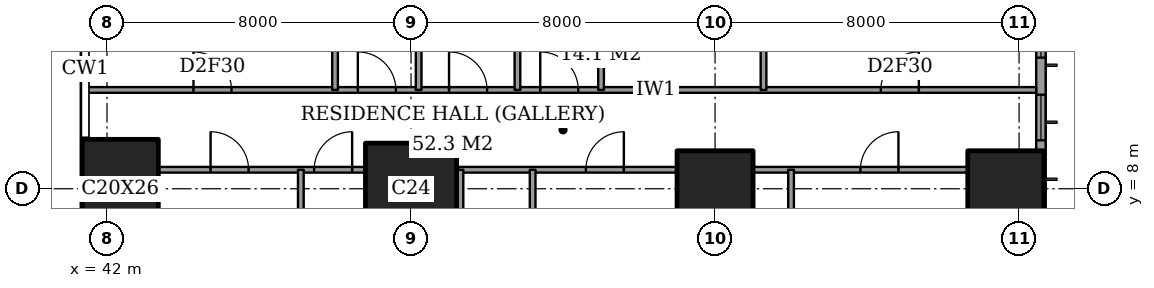
"""IFC4 building model, lengths in metres.
Left out: names, types, materials, properties, quantities, classifications, styles, units other than length and angle.
Written with IfcOpenShell. Run it as: python <this file> out.ifc"""

import sys

from ifc_helpers import new_model, si_unit, direction, frame, frame_2d, origin, origin_2d, place, context, subcontext, project, spatial, rectangle, extrude, element, fill, save


model = new_model("IFC4")
c1 = context("Model", 3, precision=1e-05, world=origin(), true_north=direction((0.0, 1.0)))
c2 = subcontext(c1, "Body", "Model", "MODEL_VIEW")
j1 = project(units=[si_unit("LENGTHUNIT", "METRE"), si_unit("PLANEANGLEUNIT", "RADIAN")], contexts=[c1])
p1 = place(None, origin())
s1 = spatial("IfcSite", under=j1, at=p1, CompositionType="ELEMENT")
p2 = place(p1, origin())
s2 = spatial("IfcBuilding", under=s1, at=p2, CompositionType="ELEMENT")
p3 = place(p2, frame((0.0, 0.0, 62.0)))
s3 = spatial("IfcBuildingStorey", under=s2, at=p3, CompositionType="ELEMENT", Elevation=62.0)
p4 = place(p3, frame((42.35, 8.0, 0.0), z_axis=(0.0, 0.0, 1.0), x_axis=(1.0, 0.0, 0.0)))
e1 = element("IfcColumn", 1, at=p4, inside=s3, PredefinedType="COLUMN", context=c2, shape_type="SweptSolid", body=[
    extrude(rectangle(XDim=2.0, YDim=2.6, at=origin_2d()), origin(), (0.0, 0.0, 1.0), 3.6),
])
p5 = place(p3, frame((50.0, 8.0, 0.0), z_axis=(0.0, 0.0, 1.0), x_axis=(1.0, 0.0, 0.0)))
e2 = element("IfcColumn", 2, at=p5, inside=s3, PredefinedType="COLUMN", context=c2, shape_type="SweptSolid", body=[
    extrude(rectangle(XDim=2.4, YDim=2.4, at=origin_2d()), origin(), (0.0, 0.0, 1.0), 3.6),
])
for number, where, z_axis, x_axis in (
    (3, (58.0, 8.0, 0.0), (0.0, 0.0, 1.0), (1.0, 0.0, 0.0)),
    (4, (65.65, 8.0, 0.0), (0.0, 0.0, 1.0), (1.0, 0.0, 0.0)),
):
    element("IfcColumn", number, at=place(p3, frame(where, z_axis=z_axis, x_axis=x_axis)), inside=s3, PredefinedType="COLUMN", context=c2, shape_type="SweptSolid", body=[
        extrude(rectangle(XDim=2.0, YDim=2.0, at=origin_2d()), origin(), (0.0, 0.0, 1.0), 3.6),
    ])
p6 = place(p3, frame((66.575, 3.175, 0.0), z_axis=(0.0, 0.0, 1.0), x_axis=(0.0, 1.0, 0.0)))
e5 = element("IfcWall", 5, at=p6, inside=s3, PredefinedType="SOLIDWALL", context=c2, shape_type="SweptSolid", body=[
    extrude(rectangle(XDim=41.65, YDim=0.25, at=frame_2d((20.825, 0.0))), origin(), (0.0, 0.0, 1.0), 3.6),
])
p7 = place(p6, frame((0.775, 0.0, 0.6)))
e6 = element("IfcOpeningElement", 6, at=p7, cuts=e5, PredefinedType="OPENING", context=c2, shape_type="SweptSolid", body=[
    extrude(rectangle(XDim=2.4, YDim=2.0, at=frame_2d((1.2, 1.0))), frame((0.0, 0.135, 0.0), z_axis=(0.0, -1.0, 0.0), x_axis=(1.0, 0.0, 0.0)), (0.0, 0.0, 1.0), 0.27),
])
p8 = place(p6, frame((6.1, 0.0, 0.6)))
e7 = element("IfcOpeningElement", 7, at=p8, cuts=e5, PredefinedType="OPENING", context=c2, shape_type="SweptSolid", body=[
    extrude(rectangle(XDim=1.2, YDim=2.0, at=frame_2d((0.6, 1.0))), frame((0.0, 0.135, 0.0), z_axis=(0.0, -1.0, 0.0), x_axis=(1.0, 0.0, 0.0)), (0.0, 0.0, 1.0), 0.27),
])
p9 = place(p6, frame((8.275, 0.0, 0.6)))
e8 = element("IfcOpeningElement", 8, at=p9, cuts=e5, PredefinedType="OPENING", context=c2, shape_type="SweptSolid", body=[
    extrude(rectangle(XDim=2.4, YDim=2.0, at=frame_2d((1.2, 1.0))), frame((0.0, 0.135, 0.0), z_axis=(0.0, -1.0, 0.0), x_axis=(1.0, 0.0, 0.0)), (0.0, 0.0, 1.0), 0.27),
])
p10 = place(p6, frame((15.775, 0.0, 0.6)))
e9 = element("IfcOpeningElement", 9, at=p10, cuts=e5, PredefinedType="OPENING", context=c2, shape_type="SweptSolid", body=[
    extrude(rectangle(XDim=2.4, YDim=2.0, at=frame_2d((1.2, 1.0))), frame((0.0, 0.135, 0.0), z_axis=(0.0, -1.0, 0.0), x_axis=(1.0, 0.0, 0.0)), (0.0, 0.0, 1.0), 0.27),
])
p11 = place(p6, frame((23.475, 0.0, 0.6)))
e10 = element("IfcOpeningElement", 10, at=p11, cuts=e5, PredefinedType="OPENING", context=c2, shape_type="SweptSolid", body=[
    extrude(rectangle(XDim=2.4, YDim=2.0, at=frame_2d((1.2, 1.0))), frame((0.0, 0.135, 0.0), z_axis=(0.0, -1.0, 0.0), x_axis=(1.0, 0.0, 0.0)), (0.0, 0.0, 1.0), 0.27),
])
p12 = place(p6, frame((30.875, 0.0, 0.6)))
e11 = element("IfcOpeningElement", 11, at=p12, cuts=e5, PredefinedType="OPENING", context=c2, shape_type="SweptSolid", body=[
    extrude(rectangle(XDim=2.4, YDim=2.0, at=frame_2d((1.2, 1.0))), frame((0.0, 0.135, 0.0), z_axis=(0.0, -1.0, 0.0), x_axis=(1.0, 0.0, 0.0)), (0.0, 0.0, 1.0), 0.27),
])
p13 = place(p6, frame((34.325, 0.0, 0.6)))
e12 = element("IfcOpeningElement", 12, at=p13, cuts=e5, PredefinedType="OPENING", context=c2, shape_type="SweptSolid", body=[
    extrude(rectangle(XDim=1.2, YDim=2.0, at=frame_2d((0.6, 1.0))), frame((0.0, 0.135, 0.0), z_axis=(0.0, -1.0, 0.0), x_axis=(1.0, 0.0, 0.0)), (0.0, 0.0, 1.0), 0.27),
])
p14 = place(p6, frame((38.475, 0.0, 0.6)))
e13 = element("IfcOpeningElement", 13, at=p14, cuts=e5, PredefinedType="OPENING", context=c2, shape_type="SweptSolid", body=[
    extrude(rectangle(XDim=2.4, YDim=2.0, at=frame_2d((1.2, 1.0))), frame((0.0, 0.135, 0.0), z_axis=(0.0, -1.0, 0.0), x_axis=(1.0, 0.0, 0.0)), (0.0, 0.0, 1.0), 0.27),
])
p15 = place(p3, frame((43.35, 8.5, 0.0), z_axis=(0.0, 0.0, 1.0), x_axis=(1.0, 0.0, 0.0)))
e14 = element("IfcWall", 14, at=p15, inside=s3, PredefinedType="PARTITIONING", context=c2, shape_type="SweptSolid", body=[
    extrude(rectangle(XDim=5.45, YDim=0.15, at=frame_2d((2.725, 0.0))), origin(), (0.0, 0.0, 1.0), 3.35),
])
p16 = place(p15, frame((4.1, 0.0, 0.0)))
e15 = element("IfcOpeningElement", 15, at=p16, cuts=e14, PredefinedType="OPENING", context=c2, shape_type="SweptSolid", body=[
    extrude(rectangle(XDim=1.0, YDim=2.1, at=frame_2d((0.5, 1.05))), frame((0.0, 0.085, 0.0), z_axis=(0.0, -1.0, 0.0), x_axis=(1.0, 0.0, 0.0)), (0.0, 0.0, 1.0), 0.17),
])
p17 = place(p15, frame((1.375, 0.0, 0.0)))
e16 = element("IfcOpeningElement", 16, at=p17, cuts=e14, PredefinedType="OPENING", context=c2, shape_type="SweptSolid", body=[
    extrude(rectangle(XDim=1.0, YDim=2.1, at=frame_2d((0.5, 1.05))), frame((0.0, 0.085, 0.0), z_axis=(0.0, -1.0, 0.0), x_axis=(1.0, 0.0, 0.0)), (0.0, 0.0, 1.0), 0.17),
])
p18 = place(p3, frame((51.2, 8.5, 0.0), z_axis=(0.0, 0.0, 1.0), x_axis=(1.0, 0.0, 0.0)))
e17 = element("IfcWall", 17, at=p18, inside=s3, PredefinedType="PARTITIONING", context=c2, shape_type="SweptSolid", body=[
    extrude(rectangle(XDim=5.8, YDim=0.15, at=frame_2d((2.9, 0.0))), origin(), (0.0, 0.0, 1.0), 3.35),
])
p19 = place(p18, frame((3.4, 0.0, 0.0)))
e18 = element("IfcOpeningElement", 18, at=p19, cuts=e17, PredefinedType="OPENING", context=c2, shape_type="SweptSolid", body=[
    extrude(rectangle(XDim=1.0, YDim=2.1, at=frame_2d((0.5, 1.05))), frame((0.0, 0.085, 0.0), z_axis=(0.0, -1.0, 0.0), x_axis=(1.0, 0.0, 0.0)), (0.0, 0.0, 1.0), 0.17),
])
p20 = place(p3, frame((59.0, 8.5, 0.0), z_axis=(0.0, 0.0, 1.0), x_axis=(1.0, 0.0, 0.0)))
e19 = element("IfcWall", 19, at=p20, inside=s3, PredefinedType="PARTITIONING", context=c2, shape_type="SweptSolid", body=[
    extrude(rectangle(XDim=5.65, YDim=0.15, at=frame_2d((2.825, 0.0))), origin(), (0.0, 0.0, 1.0), 3.35),
])
p21 = place(p20, frame((2.825, 0.0, 0.0)))
e20 = element("IfcOpeningElement", 20, at=p21, cuts=e19, PredefinedType="OPENING", context=c2, shape_type="SweptSolid", body=[
    extrude(rectangle(XDim=1.0, YDim=2.1, at=frame_2d((0.5, 1.05))), frame((0.0, 0.085, 0.0), z_axis=(0.0, -1.0, 0.0), x_axis=(1.0, 0.0, 0.0)), (0.0, 0.0, 1.0), 0.17),
])
p22 = place(p3, frame((41.439, 10.6, 0.0), z_axis=(0.0, 0.0, 1.0), x_axis=(1.0, 0.0, 0.0)))
e21 = element("IfcWall", 21, at=p22, inside=s3, PredefinedType="PARTITIONING", context=c2, shape_type="SweptSolid", body=[
    extrude(rectangle(XDim=25.011, YDim=0.15, at=frame_2d((12.505, 0.0))), origin(), (0.0, 0.0, 1.0), 3.35),
])
p23 = place(p22, frame((11.961, 0.0, 0.0)))
e22 = element("IfcOpeningElement", 22, at=p23, cuts=e21, PredefinedType="OPENING", context=c2, shape_type="SweptSolid", body=[
    extrude(rectangle(XDim=1.0, YDim=2.1, at=frame_2d((0.5, 1.05))), frame((0.0, 0.085, 0.0), z_axis=(0.0, -1.0, 0.0), x_axis=(1.0, 0.0, 0.0)), (0.0, 0.0, 1.0), 0.17),
])
p24 = place(p22, frame((20.924, 0.0, 0.0)))
e23 = element("IfcOpeningElement", 23, at=p24, cuts=e21, PredefinedType="OPENING", context=c2, shape_type="SweptSolid", body=[
    extrude(rectangle(XDim=1.0, YDim=2.1, at=frame_2d((0.5, 1.05))), frame((0.0, 0.085, 0.0), z_axis=(0.0, -1.0, 0.0), x_axis=(1.0, 0.0, 0.0)), (0.0, 0.0, 1.0), 0.17),
])
p25 = place(p22, frame((9.561, 0.0, 0.0)))
e24 = element("IfcOpeningElement", 24, at=p25, cuts=e21, PredefinedType="OPENING", context=c2, shape_type="SweptSolid", body=[
    extrude(rectangle(XDim=1.0, YDim=2.1, at=frame_2d((0.5, 1.05))), frame((0.0, 0.085, 0.0), z_axis=(0.0, -1.0, 0.0), x_axis=(1.0, 0.0, 0.0)), (0.0, 0.0, 1.0), 0.17),
])
p26 = place(p22, frame((7.161, 0.0, 0.0)))
e25 = element("IfcOpeningElement", 25, at=p26, cuts=e21, PredefinedType="OPENING", context=c2, shape_type="SweptSolid", body=[
    extrude(rectangle(XDim=1.0, YDim=2.1, at=frame_2d((0.5, 1.05))), frame((0.0, 0.085, 0.0), z_axis=(0.0, -1.0, 0.0), x_axis=(1.0, 0.0, 0.0)), (0.0, 0.0, 1.0), 0.17),
])
p27 = place(p22, frame((2.836, 0.0, 0.0)))
e26 = element("IfcOpeningElement", 26, at=p27, cuts=e21, PredefinedType="OPENING", context=c2, shape_type="SweptSolid", body=[
    extrude(rectangle(XDim=1.0, YDim=2.1, at=frame_2d((0.5, 1.05))), frame((0.0, 0.085, 0.0), z_axis=(0.0, -1.0, 0.0), x_axis=(1.0, 0.0, 0.0)), (0.0, 0.0, 1.0), 0.17),
])
p28 = place(p3, frame((47.1, -0.45, 0.0), z_axis=(0.0, 0.0, 1.0), x_axis=(0.0, 1.0, 0.0)))
e27 = element("IfcWall", 27, at=p28, inside=s3, PredefinedType="PARTITIONING", context=c2, shape_type="SweptSolid", body=[
    extrude(rectangle(XDim=8.95, YDim=0.15, at=frame_2d((4.475, 0.0))), origin(), (0.0, 0.0, 1.0), 3.35),
])
p29 = place(p3, frame((48.0, 10.6, 0.0), z_axis=(0.0, 0.0, 1.0), x_axis=(0.0, 1.0, 0.0)))
e28 = element("IfcWall", 28, at=p29, inside=s3, PredefinedType="PARTITIONING", context=c2, shape_type="SweptSolid", body=[
    extrude(rectangle(XDim=6.4, YDim=0.15, at=frame_2d((3.2, 0.0))), origin(), (0.0, 0.0, 1.0), 3.35),
])
p30 = place(p3, frame((50.2, 10.6, 0.0), z_axis=(0.0, 0.0, 1.0), x_axis=(0.0, 1.0, 0.0)))
e29 = element("IfcWall", 29, at=p30, inside=s3, PredefinedType="PARTITIONING", context=c2, shape_type="SweptSolid", body=[
    extrude(rectangle(XDim=4.2, YDim=0.15, at=frame_2d((2.1, 0.0))), origin(), (0.0, 0.0, 1.0), 3.35),
])
p31 = place(p3, frame((51.3, -0.45, 0.0), z_axis=(0.0, 0.0, 1.0), x_axis=(0.0, 1.0, 0.0)))
e30 = element("IfcWall", 30, at=p31, inside=s3, PredefinedType="PARTITIONING", context=c2, shape_type="SweptSolid", body=[
    extrude(rectangle(XDim=8.95, YDim=0.15, at=frame_2d((4.475, 0.0))), origin(), (0.0, 0.0, 1.0), 3.35),
])
p32 = place(p31, frame((4.025, 0.0, 0.0)))
e31 = element("IfcOpeningElement", 31, at=p32, cuts=e30, PredefinedType="OPENING", context=c2, shape_type="SweptSolid", body=[
    extrude(rectangle(XDim=0.9, YDim=2.1, at=frame_2d((0.45, 1.05))), frame((0.0, 0.085, 0.0), z_axis=(0.0, -1.0, 0.0), x_axis=(1.0, 0.0, 0.0)), (0.0, 0.0, 1.0), 0.17),
])
p33 = place(p3, frame((52.8, 10.6, 0.0), z_axis=(0.0, 0.0, 1.0), x_axis=(0.0, 1.0, 0.0)))
e32 = element("IfcWall", 32, at=p33, inside=s3, PredefinedType="PARTITIONING", context=c2, shape_type="SweptSolid", body=[
    extrude(rectangle(XDim=6.4, YDim=0.15, at=frame_2d((3.2, 0.0))), origin(), (0.0, 0.0, 1.0), 3.35),
])
p34 = place(p3, frame((53.2, -0.45, 0.0), z_axis=(0.0, 0.0, 1.0), x_axis=(0.0, 1.0, 0.0)))
e33 = element("IfcWall", 33, at=p34, inside=s3, PredefinedType="PARTITIONING", context=c2, shape_type="SweptSolid", body=[
    extrude(rectangle(XDim=8.95, YDim=0.15, at=frame_2d((4.475, 0.0))), origin(), (0.0, 0.0, 1.0), 3.35),
])
p35 = place(p3, frame((55.0, 10.6, 0.0), z_axis=(0.0, 0.0, 1.0), x_axis=(0.0, 1.0, 0.0)))
e34 = element("IfcWall", 34, at=p35, inside=s3, PredefinedType="PARTITIONING", context=c2, shape_type="SweptSolid", body=[
    extrude(rectangle(XDim=11.0, YDim=0.15, at=frame_2d((5.5, 0.0))), origin(), (0.0, 0.0, 1.0), 3.35),
])
p36 = place(p35, frame((8.2, 0.0, 0.0)))
e35 = element("IfcOpeningElement", 35, at=p36, cuts=e34, PredefinedType="OPENING", context=c2, shape_type="SweptSolid", body=[
    extrude(rectangle(XDim=1.0, YDim=2.1, at=frame_2d((0.5, 1.05))), frame((0.0, 0.085, 0.0), z_axis=(0.0, -1.0, 0.0), x_axis=(1.0, 0.0, 0.0)), (0.0, 0.0, 1.0), 0.17),
])
p37 = place(p3, frame((59.275, 10.6, 0.0), z_axis=(0.0, 0.0, 1.0), x_axis=(0.0, 1.0, 0.0)))
e36 = element("IfcWall", 36, at=p37, inside=s3, PredefinedType="PARTITIONING", context=c2, shape_type="SweptSolid", body=[
    extrude(rectangle(XDim=4.2, YDim=0.15, at=frame_2d((2.1, 0.0))), origin(), (0.0, 0.0, 1.0), 3.35),
])
p38 = place(p37, frame((1.25, 0.0, 0.0)))
e37 = element("IfcOpeningElement", 37, at=p38, cuts=e36, PredefinedType="OPENING", context=c2, shape_type="SweptSolid", body=[
    extrude(rectangle(XDim=0.9, YDim=2.1, at=frame_2d((0.45, 1.05))), frame((0.0, 0.085, 0.0), z_axis=(0.0, -1.0, 0.0), x_axis=(1.0, 0.0, 0.0)), (0.0, 0.0, 1.0), 0.17),
])
p39 = place(p3, frame((60.0, -0.45, 0.0), z_axis=(0.0, 0.0, 1.0), x_axis=(0.0, 1.0, 0.0)))
e38 = element("IfcWall", 38, at=p39, inside=s3, PredefinedType="PARTITIONING", context=c2, shape_type="SweptSolid", body=[
    extrude(rectangle(XDim=8.95, YDim=0.15, at=frame_2d((4.475, 0.0))), origin(), (0.0, 0.0, 1.0), 3.35),
])
p40 = place(p8, origin())
e39 = element("IfcWindow", 39, at=p40, inside=s3, PartitioningType="SINGLE_PANEL", PredefinedType="WINDOW", context=c2, shape_type="SweptSolid", body=[
    extrude(rectangle(XDim=1.2, YDim=2.0, at=frame_2d((0.6, 1.0))), frame((0.0, 0.03, 0.0), z_axis=(0.0, -1.0, 0.0), x_axis=(1.0, 0.0, 0.0)), (0.0, 0.0, 1.0), 0.06),
])
fill(e7, e39)
p41 = place(p9, origin())
e40 = element("IfcWindow", 40, at=p41, inside=s3, PartitioningType="SINGLE_PANEL", PredefinedType="WINDOW", context=c2, shape_type="SweptSolid", body=[
    extrude(rectangle(XDim=2.4, YDim=2.0, at=frame_2d((1.2, 1.0))), frame((0.0, 0.03, 0.0), z_axis=(0.0, -1.0, 0.0), x_axis=(1.0, 0.0, 0.0)), (0.0, 0.0, 1.0), 0.06),
])
fill(e8, e40)
p42 = place(p21, origin())
e41 = element("IfcDoor", 41, at=p42, inside=s3, OperationType="SINGLE_SWING_LEFT", PredefinedType="DOOR", context=c2, shape_type="SweptSolid", body=[
    extrude(rectangle(XDim=1.0, YDim=2.1, at=frame_2d((0.5, 1.05))), frame((0.0, 0.025, 0.0), z_axis=(0.0, -1.0, 0.0), x_axis=(1.0, 0.0, 0.0)), (0.0, 0.0, 1.0), 0.05),
])
fill(e20, e41)
p43 = place(p19, origin())
e42 = element("IfcDoor", 42, at=p43, inside=s3, OperationType="SINGLE_SWING_LEFT", PredefinedType="DOOR", context=c2, shape_type="SweptSolid", body=[
    extrude(rectangle(XDim=1.0, YDim=2.1, at=frame_2d((0.5, 1.05))), frame((0.0, 0.025, 0.0), z_axis=(0.0, -1.0, 0.0), x_axis=(1.0, 0.0, 0.0)), (0.0, 0.0, 1.0), 0.05),
])
fill(e18, e42)
p44 = place(p16, origin())
e43 = element("IfcDoor", 43, at=p44, inside=s3, OperationType="SINGLE_SWING_LEFT", PredefinedType="DOOR", context=c2, shape_type="SweptSolid", body=[
    extrude(rectangle(XDim=1.0, YDim=2.1, at=frame_2d((0.5, 1.05))), frame((0.0, 0.025, 0.0), z_axis=(0.0, -1.0, 0.0), x_axis=(1.0, 0.0, 0.0)), (0.0, 0.0, 1.0), 0.05),
])
fill(e15, e43)
p45 = place(p17, origin())
e44 = element("IfcDoor", 44, at=p45, inside=s3, OperationType="SINGLE_SWING_RIGHT", PredefinedType="DOOR", context=c2, shape_type="SweptSolid", body=[
    extrude(rectangle(XDim=1.0, YDim=2.1, at=frame_2d((0.5, 1.05))), frame((0.0, 0.025, 0.0), z_axis=(0.0, -1.0, 0.0), x_axis=(1.0, 0.0, 0.0)), (0.0, 0.0, 1.0), 0.05),
])
fill(e16, e44)
p46 = place(p23, origin())
e45 = element("IfcDoor", 45, at=p46, inside=s3, OperationType="SINGLE_SWING_RIGHT", PredefinedType="DOOR", context=c2, shape_type="SweptSolid", body=[
    extrude(rectangle(XDim=1.0, YDim=2.1, at=frame_2d((0.5, 1.05))), frame((0.0, 0.025, 0.0), z_axis=(0.0, -1.0, 0.0), x_axis=(1.0, 0.0, 0.0)), (0.0, 0.0, 1.0), 0.05),
])
fill(e22, e45)
p47 = place(p24, origin())
e46 = element("IfcDoor", 46, at=p47, inside=s3, OperationType="SINGLE_SWING_LEFT", PredefinedType="DOOR", context=c2, shape_type="SweptSolid", body=[
    extrude(rectangle(XDim=1.0, YDim=2.1, at=frame_2d((0.5, 1.05))), frame((0.0, 0.025, 0.0), z_axis=(0.0, -1.0, 0.0), x_axis=(1.0, 0.0, 0.0)), (0.0, 0.0, 1.0), 0.05),
])
fill(e23, e46)
p48 = place(p25, origin())
e47 = element("IfcDoor", 47, at=p48, inside=s3, OperationType="SINGLE_SWING_RIGHT", PredefinedType="DOOR", context=c2, shape_type="SweptSolid", body=[
    extrude(rectangle(XDim=1.0, YDim=2.1, at=frame_2d((0.5, 1.05))), frame((0.0, 0.025, 0.0), z_axis=(0.0, -1.0, 0.0), x_axis=(1.0, 0.0, 0.0)), (0.0, 0.0, 1.0), 0.05),
])
fill(e24, e47)
p49 = place(p26, origin())
e48 = element("IfcDoor", 48, at=p49, inside=s3, OperationType="SINGLE_SWING_RIGHT", PredefinedType="DOOR", context=c2, shape_type="SweptSolid", body=[
    extrude(rectangle(XDim=1.0, YDim=2.1, at=frame_2d((0.5, 1.05))), frame((0.0, 0.025, 0.0), z_axis=(0.0, -1.0, 0.0), x_axis=(1.0, 0.0, 0.0)), (0.0, 0.0, 1.0), 0.05),
])
fill(e25, e48)
p50 = place(p27, origin())
e49 = element("IfcDoor", 49, at=p50, inside=s3, OperationType="SINGLE_SWING_RIGHT", PredefinedType="DOOR", context=c2, shape_type="SweptSolid", body=[
    extrude(rectangle(XDim=1.0, YDim=2.1, at=frame_2d((0.5, 1.05))), frame((0.0, 0.025, 0.0), z_axis=(0.0, -1.0, 0.0), x_axis=(1.0, 0.0, 0.0)), (0.0, 0.0, 1.0), 0.05),
])
fill(e26, e49)
save(model, sys.argv[1])
